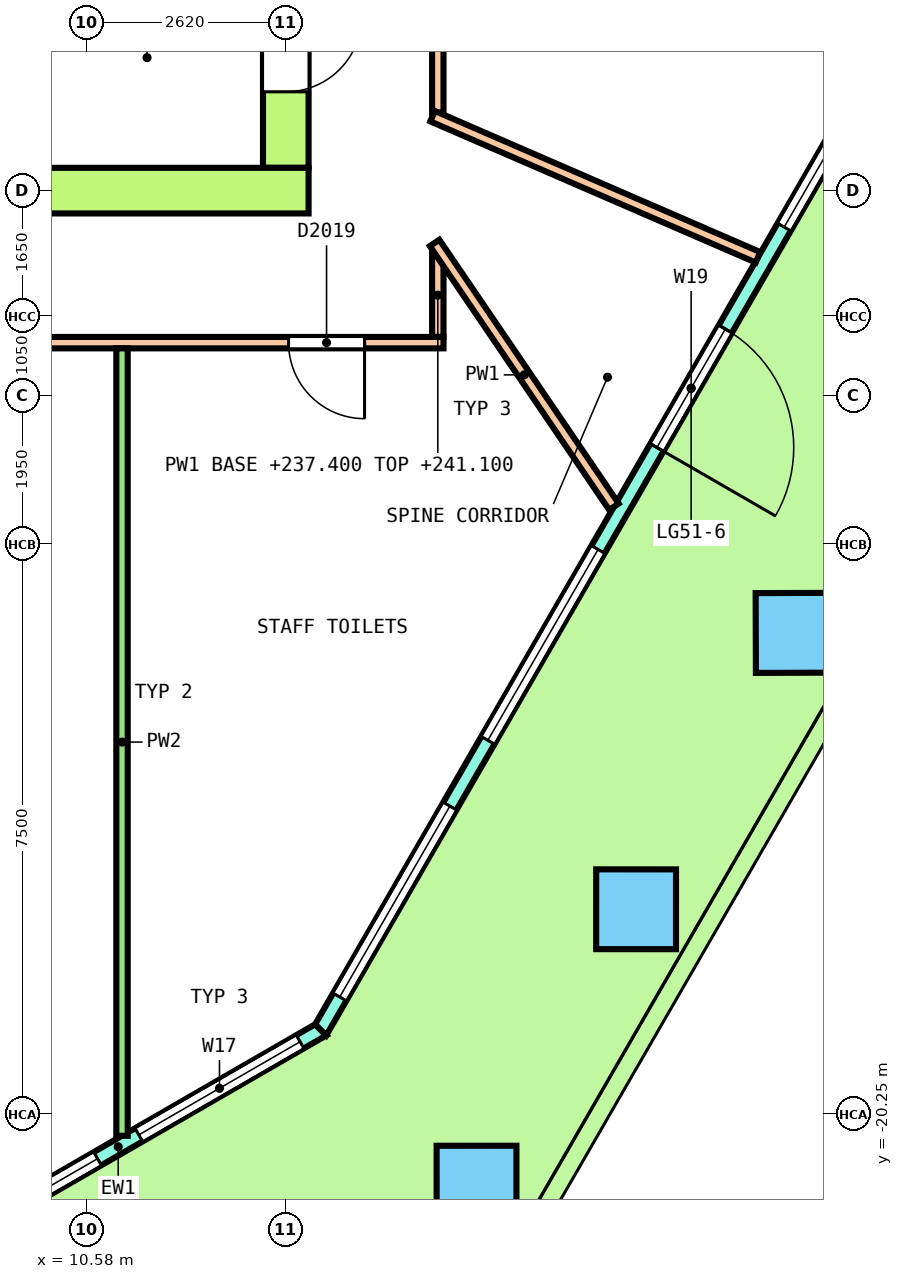
"""IFC4 building model, lengths in metres.
Left out: names, types, materials, properties, quantities, classifications, styles, units other than length and angle.
Written with IfcOpenShell. Run it as: python <this file> out.ifc"""

import sys

from ifc_helpers import new_model, si_unit, direction, frame, frame_2d, origin, origin_2d, place, context, subcontext, project, spatial, polyline, rectangle, outline, extrude, element, fill, save


model = new_model("IFC4")
c1 = context("Model", 3, precision=1e-05, world=origin(), true_north=direction((0.0, 1.0)))
c2 = subcontext(c1, "Body", "Model", "MODEL_VIEW")
j1 = project(units=[si_unit("LENGTHUNIT", "METRE"), si_unit("PLANEANGLEUNIT", "RADIAN")], contexts=[c1])
p1 = place(None, origin())
s1 = spatial("IfcSite", under=j1, at=p1, CompositionType="ELEMENT")
p2 = place(p1, origin())
s2 = spatial("IfcBuilding", under=s1, at=p2, CompositionType="ELEMENT")
p3 = place(p2, frame((0.0, 0.0, 237.4)))
s3 = spatial("IfcBuildingStorey", under=s2, at=p3, CompositionType="ELEMENT", Elevation=237.4)
p4 = place(p3, frame((15.709, -21.19, 0.0), z_axis=(-0.018113955825, -0.03141534774, 0.999342263957), x_axis=(0.499040514287, 0.865819568771, 0.036263472456)))
e1 = element("IfcColumn", 1, at=p4, inside=s3, PredefinedType="COLUMN", context=c2, shape_type="SweptSolid", body=[
    extrude(rectangle(XDim=1.05, YDim=1.05, at=origin_2d()), origin(), (0.0, 0.0, 1.0), 3.653),
])
p5 = place(p3, frame((17.809, -17.554, 0.0), z_axis=(-0.010899694483, -0.018857140148, 0.999762774325), x_axis=(0.500590334681, 0.865410262129, 0.021780611228)))
e2 = element("IfcColumn", 2, at=p5, inside=s3, PredefinedType="COLUMN", context=c2, shape_type="SweptSolid", body=[
    extrude(rectangle(XDim=1.05, YDim=1.05, at=origin_2d()), origin(), (0.0, 0.0, 1.0), 3.651),
])
p6 = place(p3, frame((19.908, -13.918, 0.0), z_axis=(-0.003611705113, -0.006220158806, 0.999974132271), x_axis=(0.499321585349, 0.866386876722, 0.007192652341)))
e3 = element("IfcColumn", 3, at=p6, inside=s3, PredefinedType="COLUMN", context=c2, shape_type="SweptSolid", body=[
    extrude(rectangle(XDim=1.05, YDim=1.05, at=origin_2d()), origin(), (0.0, 0.0, 1.0), 3.65),
])
p7 = place(p3, frame((8.331, -22.217, 0.0), z_axis=(0.0, 0.0, 1.0), x_axis=(0.866019727221, 0.500009831968, 0.0)))
e4 = element("IfcWall", 4, at=p7, inside=s3, PredefinedType="SOLIDWALL", context=c2, shape_type="SweptSolid", body=[
    extrude(outline(polyline([(-0.027, -0.1), (1.008, -0.1), (2.042, -0.1), (3.076, -0.1), (4.111, -0.1), (5.145, -0.1), (6.18, -0.1), (6.126, 0.1), (5.109, 0.1), (4.093, 0.1), (3.076, 0.1), (2.06, 0.1), (1.043, 0.1), (0.027, 0.1), (-0.027, -0.1)])), origin(), (0.0, 0.0, 1.0), 3.7),
])
p8 = place(p7, frame((0.313, 0.0, 0.1)))
e5 = element("IfcOpeningElement", 5, at=p8, cuts=e4, PredefinedType="OPENING", context=c2, shape_type="SweptSolid", body=[
    extrude(rectangle(XDim=2.45, YDim=2.65, at=frame_2d((1.225, 1.325))), frame((0.0, 0.11, 0.0), z_axis=(0.0, -1.0, 0.0), x_axis=(1.0, 0.0, 0.0)), (0.0, 0.0, 1.0), 0.22),
])
p9 = place(p7, frame((3.39, 0.0, 0.1)))
e6 = element("IfcOpeningElement", 6, at=p9, cuts=e4, PredefinedType="OPENING", context=c2, shape_type="SweptSolid", body=[
    extrude(rectangle(XDim=2.45, YDim=2.65, at=frame_2d((1.225, 1.325))), frame((0.0, 0.11, 0.0), z_axis=(0.0, -1.0, 0.0), x_axis=(1.0, 0.0, 0.0)), (0.0, 0.0, 1.0), 0.22),
])
p10 = place(p3, frame((13.66, -19.141, 0.0), z_axis=(0.0, 0.0, 1.0), x_axis=(0.500001086243, 0.866024776641, 0.0)))
e7 = element("IfcWall", 7, at=p10, inside=s3, PredefinedType="SOLIDWALL", context=c2, shape_type="SweptSolid", body=[
    extrude(outline(polyline([(-0.027, -0.1), (1.002, -0.1), (2.031, -0.1), (3.059, -0.1), (4.088, -0.1), (5.117, -0.1), (6.146, -0.1), (7.175, -0.1), (8.203, -0.1), (9.232, -0.1), (10.261, -0.1), (11.29, -0.1), (12.318, -0.1), (13.347, -0.1), (14.376, -0.1), (15.405, -0.1), (16.433, -0.1), (17.462, -0.1), (18.491, -0.1), (19.52, -0.1), (19.466, 0.1), (18.443, 0.1), (17.42, 0.1), (16.396, 0.1), (15.373, 0.1), (14.35, 0.1), (13.327, 0.1), (12.304, 0.1), (11.281, 0.1), (10.258, 0.1), (9.235, 0.1), (8.212, 0.1), (7.188, 0.1), (6.166, 0.1), (5.142, 0.1), (4.119, 0.1), (3.096, 0.1), (2.073, 0.1), (1.05, 0.1), (0.027, 0.1), (-0.027, -0.1)])), origin(), (0.0, 0.0, 1.0), 3.7),
])
p11 = place(p10, frame((0.499, 0.0, 0.1)))
e8 = element("IfcOpeningElement", 8, at=p11, cuts=e7, PredefinedType="OPENING", context=c2, shape_type="SweptSolid", body=[
    extrude(rectangle(XDim=2.9, YDim=2.65, at=frame_2d((1.45, 1.325))), frame((0.0, 0.11, 0.0), z_axis=(0.0, -1.0, 0.0), x_axis=(1.0, 0.0, 0.0)), (0.0, 0.0, 1.0), 0.22),
])
p12 = place(p10, frame((4.398, 0.0, 0.1)))
e9 = element("IfcOpeningElement", 9, at=p12, cuts=e7, PredefinedType="OPENING", context=c2, shape_type="SweptSolid", body=[
    extrude(rectangle(XDim=2.9, YDim=2.65, at=frame_2d((1.45, 1.325))), frame((0.0, 0.11, 0.0), z_axis=(0.0, -1.0, 0.0), x_axis=(1.0, 0.0, 0.0)), (0.0, 0.0, 1.0), 0.22),
])
p13 = place(p10, frame((8.846, 0.0, 0.0)))
e10 = element("IfcOpeningElement", 10, at=p13, cuts=e7, PredefinedType="OPENING", context=c2, shape_type="SweptSolid", body=[
    extrude(rectangle(XDim=1.8, YDim=2.4, at=frame_2d((0.9, 1.2))), frame((0.0, 0.11, 0.0), z_axis=(0.0, -1.0, 0.0), x_axis=(1.0, 0.0, 0.0)), (0.0, 0.0, 1.0), 0.22),
])
p14 = place(p10, frame((8.846, 0.0, 2.55)))
e11 = element("IfcOpeningElement", 11, at=p14, cuts=e7, PredefinedType="OPENING", context=c2, shape_type="SweptSolid", body=[
    extrude(rectangle(XDim=1.8, YDim=0.2, at=frame_2d((0.9, 0.1))), frame((0.0, 0.11, 0.0), z_axis=(0.0, -1.0, 0.0), x_axis=(1.0, 0.0, 0.0)), (0.0, 0.0, 1.0), 0.22),
])
p15 = place(p10, frame((12.195, 0.0, 0.1)))
e12 = element("IfcOpeningElement", 12, at=p15, cuts=e7, PredefinedType="OPENING", context=c2, shape_type="SweptSolid", body=[
    extrude(rectangle(XDim=2.9, YDim=2.65, at=frame_2d((1.45, 1.325))), frame((0.0, 0.11, 0.0), z_axis=(0.0, -1.0, 0.0), x_axis=(1.0, 0.0, 0.0)), (0.0, 0.0, 1.0), 0.22),
])
p16 = place(p10, frame((16.094, 0.0, 0.1)))
e13 = element("IfcOpeningElement", 13, at=p16, cuts=e7, PredefinedType="OPENING", context=c2, shape_type="SweptSolid", body=[
    extrude(rectangle(XDim=2.9, YDim=2.65, at=frame_2d((1.45, 1.325))), frame((0.0, 0.11, 0.0), z_axis=(0.0, -1.0, 0.0), x_axis=(1.0, 0.0, 0.0)), (0.0, 0.0, 1.0), 0.22),
])
p17 = place(p3, frame((-13.5, -8.1, 0.0), z_axis=(0.0, 0.0, 1.0), x_axis=(1.0, 0.0, 0.0)))
e14 = element("IfcWall", 14, at=p17, inside=s3, PredefinedType="SHEAR", context=c2, shape_type="SweptSolid", body=[
    extrude(rectangle(XDim=27.0, YDim=0.6, at=frame_2d((13.5, 0.0))), origin(), (0.0, 0.0, 1.0), 3.7),
])
p18 = place(p17, frame((15.05, 0.0, 0.0)))
e15 = element("IfcOpeningElement", 15, at=p18, cuts=e14, PredefinedType="OPENING", context=c2, shape_type="SweptSolid", body=[
    extrude(rectangle(XDim=1.2, YDim=2.1, at=frame_2d((0.6, 1.05))), frame((0.0, 0.31, 0.0), z_axis=(0.0, -1.0, 0.0), x_axis=(1.0, 0.0, 0.0)), (0.0, 0.0, 1.0), 0.62),
])
p19 = place(p3, frame((13.2, -7.8, 0.0), z_axis=(0.0, 0.0, 1.0), x_axis=(0.0, 1.0, 0.0)))
e16 = element("IfcWall", 16, at=p19, inside=s3, PredefinedType="SHEAR", context=c2, shape_type="SweptSolid", body=[
    extrude(rectangle(XDim=15.6, YDim=0.6, at=frame_2d((7.8, 0.0))), origin(), (0.0, 0.0, 1.0), 3.7),
])
p20 = place(p19, frame((6.6, 0.0, 0.0)))
e17 = element("IfcOpeningElement", 17, at=p20, cuts=e16, PredefinedType="OPENING", context=c2, shape_type="SweptSolid", body=[
    extrude(rectangle(XDim=2.4, YDim=2.1, at=frame_2d((1.2, 1.05))), frame((0.0, 0.31, 0.0), z_axis=(0.0, -1.0, 0.0), x_axis=(1.0, 0.0, 0.0)), (0.0, 0.0, 1.0), 0.62),
])
p21 = place(p19, frame((13.5, 0.0, 0.0)))
e18 = element("IfcOpeningElement", 18, at=p21, cuts=e16, PredefinedType="OPENING", context=c2, shape_type="SweptSolid", body=[
    extrude(rectangle(XDim=1.2, YDim=2.1, at=frame_2d((0.6, 1.05))), frame((0.0, 0.31, 0.0), z_axis=(0.0, -1.0, 0.0), x_axis=(1.0, 0.0, 0.0)), (0.0, 0.0, 1.0), 0.62),
])
p22 = place(p19, frame((1.0, 0.0, 0.0)))
e19 = element("IfcOpeningElement", 19, at=p22, cuts=e16, PredefinedType="OPENING", context=c2, shape_type="SweptSolid", body=[
    extrude(rectangle(XDim=1.0, YDim=2.1, at=frame_2d((0.5, 1.05))), frame((0.0, 0.31, 0.0), z_axis=(0.0, -1.0, 0.0), x_axis=(1.0, 0.0, 0.0)), (0.0, 0.0, 1.0), 0.62),
])
p23 = place(p3, frame((15.2, -10.025, 0.0), z_axis=(0.0, 0.0, 1.0), x_axis=(0.0, 1.0, 0.0)))
e20 = element("IfcWall", 20, at=p23, inside=s3, PredefinedType="PARTITIONING", context=c2, shape_type="SweptSolid", body=[
    extrude(rectangle(XDim=1.1, YDim=0.15, at=frame_2d((0.55, 0.0))), origin(), (0.0, 0.0, 1.0), 3.7),
])
p24 = place(p3, frame((15.2, -7.075, 0.0), z_axis=(0.0, 0.0, 1.0), x_axis=(0.0, 1.0, 0.0)))
e21 = element("IfcWall", 21, at=p24, inside=s3, PredefinedType="PARTITIONING", context=c2, shape_type="SweptSolid", body=[
    extrude(rectangle(XDim=17.1, YDim=0.15, at=frame_2d((8.55, 0.0))), origin(), (0.0, 0.0, 1.0), 2.8),
])
p25 = place(p24, frame((7.292, 0.0, 0.0)))
e22 = element("IfcOpeningElement", 22, at=p25, cuts=e21, PredefinedType="OPENING", context=c2, shape_type="SweptSolid", body=[
    extrude(rectangle(XDim=1.2, YDim=2.1, at=frame_2d((0.6, 1.05))), frame((0.0, 0.085, 0.0), z_axis=(0.0, -1.0, 0.0), x_axis=(1.0, 0.0, 0.0)), (0.0, 0.0, 1.0), 0.17),
])
p26 = place(p24, frame((12.707, 0.0, 0.0)))
e23 = element("IfcOpeningElement", 23, at=p26, cuts=e21, PredefinedType="OPENING", context=c2, shape_type="SweptSolid", body=[
    extrude(rectangle(XDim=1.2, YDim=2.1, at=frame_2d((0.6, 1.05))), frame((0.0, 0.085, 0.0), z_axis=(0.0, -1.0, 0.0), x_axis=(1.0, 0.0, 0.0)), (0.0, 0.0, 1.0), 0.17),
])
p27 = place(p24, frame((2.648, 0.0, 0.0)))
e24 = element("IfcOpeningElement", 24, at=p27, cuts=e21, PredefinedType="OPENING", context=c2, shape_type="SweptSolid", body=[
    extrude(rectangle(XDim=1.0, YDim=2.1, at=frame_2d((0.5, 1.05))), frame((0.0, 0.085, 0.0), z_axis=(0.0, -1.0, 0.0), x_axis=(1.0, 0.0, 0.0)), (0.0, 0.0, 1.0), 0.17),
])
p28 = place(p3, frame((-15.275, -10.1, 0.0), z_axis=(0.0, 0.0, 1.0), x_axis=(1.0, 0.0, 0.0)))
e25 = element("IfcWall", 25, at=p28, inside=s3, PredefinedType="PARTITIONING", context=c2, shape_type="SweptSolid", body=[
    extrude(rectangle(XDim=30.55, YDim=0.15, at=frame_2d((15.275, 0.0))), origin(), (0.0, 0.0, 1.0), 2.8),
])
p29 = place(p28, frame((3.108, 0.0, 0.0)))
e26 = element("IfcOpeningElement", 26, at=p29, cuts=e25, PredefinedType="OPENING", context=c2, shape_type="SweptSolid", body=[
    extrude(rectangle(XDim=1.2, YDim=2.1, at=frame_2d((0.6, 1.05))), frame((0.0, 0.085, 0.0), z_axis=(0.0, -1.0, 0.0), x_axis=(1.0, 0.0, 0.0)), (0.0, 0.0, 1.0), 0.17),
])
p30 = place(p28, frame((8.464, 0.0, 0.0)))
e27 = element("IfcOpeningElement", 27, at=p30, cuts=e25, PredefinedType="OPENING", context=c2, shape_type="SweptSolid", body=[
    extrude(rectangle(XDim=1.2, YDim=2.1, at=frame_2d((0.6, 1.05))), frame((0.0, 0.085, 0.0), z_axis=(0.0, -1.0, 0.0), x_axis=(1.0, 0.0, 0.0)), (0.0, 0.0, 1.0), 0.17),
])
p31 = place(p28, frame((15.2, 0.0, 0.0)))
e28 = element("IfcOpeningElement", 28, at=p31, cuts=e25, PredefinedType="OPENING", context=c2, shape_type="SweptSolid", body=[
    extrude(rectangle(XDim=1.0, YDim=2.1, at=frame_2d((0.5, 1.05))), frame((0.0, 0.085, 0.0), z_axis=(0.0, -1.0, 0.0), x_axis=(1.0, 0.0, 0.0)), (0.0, 0.0, 1.0), 0.17),
])
p32 = place(p28, frame((23.325, 0.0, 0.0)))
e29 = element("IfcOpeningElement", 29, at=p32, cuts=e25, PredefinedType="OPENING", context=c2, shape_type="SweptSolid", body=[
    extrude(rectangle(XDim=1.2, YDim=2.1, at=frame_2d((0.6, 1.05))), frame((0.0, 0.085, 0.0), z_axis=(0.0, -1.0, 0.0), x_axis=(1.0, 0.0, 0.0)), (0.0, 0.0, 1.0), 0.17),
])
p33 = place(p28, frame((28.511, 0.0, 0.0)))
e30 = element("IfcOpeningElement", 30, at=p33, cuts=e25, PredefinedType="OPENING", context=c2, shape_type="SweptSolid", body=[
    extrude(rectangle(XDim=1.0, YDim=2.1, at=frame_2d((0.5, 1.05))), frame((0.0, 0.085, 0.0), z_axis=(0.0, -1.0, 0.0), x_axis=(1.0, 0.0, 0.0)), (0.0, 0.0, 1.0), 0.17),
])
p34 = place(p3, frame((15.158, -8.788, 0.0), z_axis=(0.0, 0.0, 1.0), x_axis=(0.562208188703, -0.82699573914, 0.0)))
e31 = element("IfcWall", 31, at=p34, inside=s3, PredefinedType="PARTITIONING", context=c2, shape_type="SweptSolid", body=[
    extrude(rectangle(XDim=4.197, YDim=0.15, at=frame_2d((2.099, 0.0))), origin(), (0.0, 0.0, 1.0), 2.8),
])
p35 = place(p3, frame((15.131, -7.12, 0.0), z_axis=(0.0, 0.0, 1.0), x_axis=(0.917412410679, -0.397937769924, 0.0)))
e32 = element("IfcWall", 32, at=p35, inside=s3, PredefinedType="PARTITIONING", context=c2, shape_type="SweptSolid", body=[
    extrude(rectangle(XDim=4.667, YDim=0.15, at=frame_2d((2.333, 0.0))), origin(), (0.0, 0.0, 1.0), 2.8),
])
p36 = place(p3, frame((11.045, -20.534, 0.0), z_axis=(0.0, 0.0, 1.0), x_axis=(0.0, 1.0, 0.0)))
e33 = element("IfcWall", 33, at=p36, inside=s3, PredefinedType="PARTITIONING", context=c2, shape_type="SweptSolid", body=[
    extrude(rectangle(XDim=10.359, YDim=0.15, at=frame_2d((5.18, 0.0))), origin(), (0.0, 0.0, 1.0), 2.8),
])
p37 = place(p8, origin())
e34 = element("IfcWindow", 34, at=p37, inside=s3, PartitioningType="SINGLE_PANEL", PredefinedType="WINDOW", context=c2, shape_type="SweptSolid", body=[
    extrude(rectangle(XDim=2.45, YDim=2.65, at=frame_2d((1.225, 1.325))), frame((0.0, 0.03, 0.0), z_axis=(0.0, -1.0, 0.0), x_axis=(1.0, 0.0, 0.0)), (0.0, 0.0, 1.0), 0.06),
])
fill(e5, e34)
p38 = place(p9, origin())
e35 = element("IfcWindow", 35, at=p38, inside=s3, PartitioningType="SINGLE_PANEL", PredefinedType="WINDOW", context=c2, shape_type="SweptSolid", body=[
    extrude(rectangle(XDim=2.45, YDim=2.65, at=frame_2d((1.225, 1.325))), frame((0.0, 0.03, 0.0), z_axis=(0.0, -1.0, 0.0), x_axis=(1.0, 0.0, 0.0)), (0.0, 0.0, 1.0), 0.06),
])
fill(e6, e35)
p39 = place(p11, origin())
e36 = element("IfcWindow", 36, at=p39, inside=s3, PartitioningType="SINGLE_PANEL", PredefinedType="WINDOW", context=c2, shape_type="SweptSolid", body=[
    extrude(rectangle(XDim=2.9, YDim=2.65, at=frame_2d((1.45, 1.325))), frame((0.0, 0.03, 0.0), z_axis=(0.0, -1.0, 0.0), x_axis=(1.0, 0.0, 0.0)), (0.0, 0.0, 1.0), 0.06),
])
fill(e8, e36)
p40 = place(p12, origin())
e37 = element("IfcWindow", 37, at=p40, inside=s3, PartitioningType="SINGLE_PANEL", PredefinedType="WINDOW", context=c2, shape_type="SweptSolid", body=[
    extrude(rectangle(XDim=2.9, YDim=2.65, at=frame_2d((1.45, 1.325))), frame((0.0, 0.03, 0.0), z_axis=(0.0, -1.0, 0.0), x_axis=(1.0, 0.0, 0.0)), (0.0, 0.0, 1.0), 0.06),
])
fill(e9, e37)
p41 = place(p13, origin())
e38 = element("IfcDoor", 38, at=p41, inside=s3, OperationType="DOUBLE_DOOR_SINGLE_SWING", PredefinedType="DOOR", context=c2, shape_type="SweptSolid", body=[
    extrude(rectangle(XDim=1.8, YDim=2.4, at=frame_2d((0.9, 1.2))), frame((0.0, 0.025, 0.0), z_axis=(0.0, -1.0, 0.0), x_axis=(1.0, 0.0, 0.0)), (0.0, 0.0, 1.0), 0.05),
])
fill(e10, e38)
p42 = place(p14, origin())
e39 = element("IfcWindow", 39, at=p42, inside=s3, PartitioningType="SINGLE_PANEL", PredefinedType="WINDOW", context=c2, shape_type="SweptSolid", body=[
    extrude(rectangle(XDim=1.8, YDim=0.2, at=frame_2d((0.9, 0.1))), frame((0.0, 0.03, 0.0), z_axis=(0.0, -1.0, 0.0), x_axis=(1.0, 0.0, 0.0)), (0.0, 0.0, 1.0), 0.06),
])
fill(e11, e39)
p43 = place(p15, origin())
e40 = element("IfcWindow", 40, at=p43, inside=s3, PartitioningType="SINGLE_PANEL", PredefinedType="WINDOW", context=c2, shape_type="SweptSolid", body=[
    extrude(rectangle(XDim=2.9, YDim=2.65, at=frame_2d((1.45, 1.325))), frame((0.0, 0.03, 0.0), z_axis=(0.0, -1.0, 0.0), x_axis=(1.0, 0.0, 0.0)), (0.0, 0.0, 1.0), 0.06),
])
fill(e12, e40)
p44 = place(p22, origin())
e41 = element("IfcDoor", 41, at=p44, inside=s3, OperationType="SINGLE_SWING_LEFT", PredefinedType="DOOR", context=c2, shape_type="SweptSolid", body=[
    extrude(rectangle(XDim=1.0, YDim=2.1, at=frame_2d((0.5, 1.05))), frame((0.0, 0.25, 0.0), z_axis=(0.0, -1.0, 0.0), x_axis=(1.0, 0.0, 0.0)), (0.0, 0.0, 1.0), 0.5),
])
fill(e19, e41)
p45 = place(p33, origin())
e42 = element("IfcDoor", 42, at=p45, inside=s3, OperationType="SINGLE_SWING_LEFT", PredefinedType="DOOR", context=c2, shape_type="SweptSolid", body=[
    extrude(rectangle(XDim=1.0, YDim=2.1, at=frame_2d((0.5, 1.05))), frame((0.0, 0.025, 0.0), z_axis=(0.0, -1.0, 0.0), x_axis=(1.0, 0.0, 0.0)), (0.0, 0.0, 1.0), 0.05),
])
fill(e30, e42)
save(model, sys.argv[1])
